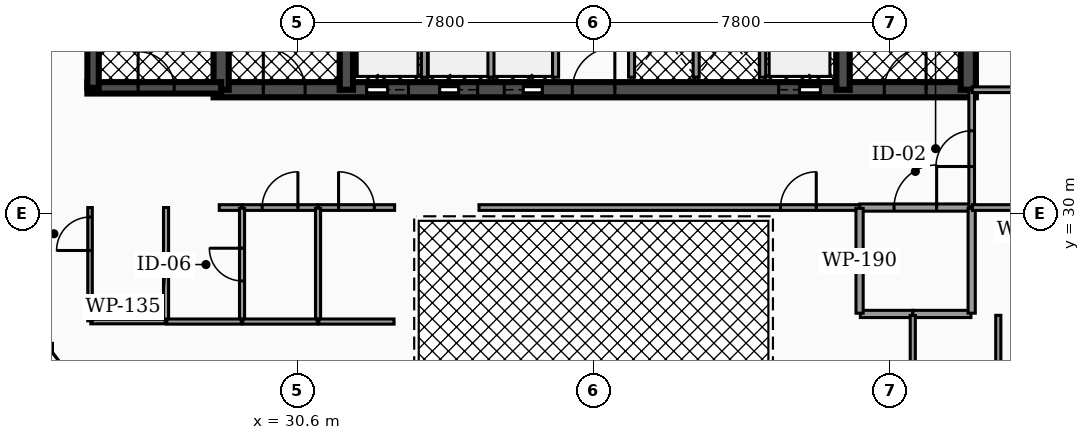
"""IFC4 building model, lengths in metres.
Left out: names, types, materials, properties, quantities, classifications, styles, units other than length and angle.
Written with IfcOpenShell. Run it as: python <this file> out.ifc"""

import sys

from ifc_helpers import new_model, si_unit, direction, frame, frame_2d, origin, place, context, subcontext, project, spatial, rectangle, extrude, element, fill, save


model = new_model("IFC4")
c1 = context("Model", 3, precision=1e-05, world=origin(), true_north=direction((0.0, 1.0)))
c2 = subcontext(c1, "Body", "Model", "MODEL_VIEW")
j1 = project(units=[si_unit("LENGTHUNIT", "METRE"), si_unit("PLANEANGLEUNIT", "RADIAN")], contexts=[c1])
p1 = place(None, origin())
s1 = spatial("IfcSite", under=j1, at=p1, CompositionType="ELEMENT")
p2 = place(p1, origin())
s2 = spatial("IfcBuilding", under=s1, at=p2, CompositionType="ELEMENT")
p3 = place(p2, frame((0.0, 0.0, 164.56)))
s3 = spatial("IfcBuildingStorey", under=s2, at=p3, CompositionType="ELEMENT", Elevation=164.56)
p4 = place(p3, frame((28.4, 33.25, 0.0), z_axis=(0.0, 0.0, 1.0), x_axis=(1.0, 0.0, 0.0)))
e1 = element("IfcWall", 1, at=p4, inside=s3, PredefinedType="SHEAR", context=c2, shape_type="SweptSolid", body=[
    extrude(rectangle(XDim=20.06, YDim=0.4, at=frame_2d((10.03, 0.0))), origin(), (0.0, 0.0, 1.0), 3.5),
])
p5 = place(p4, frame((4.03, 0.0, 0.0)))
e2 = element("IfcOpeningElement", 2, at=p5, cuts=e1, PredefinedType="OPENING", context=c2, shape_type="SweptSolid", body=[
    extrude(rectangle(XDim=1.1, YDim=2.15, at=frame_2d((0.55, 1.075))), frame((0.0, 0.21, 0.0), z_axis=(0.0, -1.0, 0.0), x_axis=(1.0, 0.0, 0.0)), (0.0, 0.0, 1.0), 0.42),
])
p6 = place(p4, frame((14.87, 0.0, 0.0)))
e3 = element("IfcOpeningElement", 3, at=p6, cuts=e1, PredefinedType="OPENING", context=c2, shape_type="SweptSolid", body=[
    extrude(rectangle(XDim=1.1, YDim=2.15, at=frame_2d((0.55, 1.075))), frame((0.0, 0.21, 0.0), z_axis=(0.0, -1.0, 0.0), x_axis=(1.0, 0.0, 0.0)), (0.0, 0.0, 1.0), 0.42),
])
p7 = place(p4, frame((5.95, 0.0, 0.0)))
e4 = element("IfcOpeningElement", 4, at=p7, cuts=e1, PredefinedType="OPENING", context=c2, shape_type="SweptSolid", body=[
    extrude(rectangle(XDim=1.0, YDim=2.1, at=frame_2d((0.5, 1.05))), frame((0.0, 0.21, 0.0), z_axis=(0.0, -1.0, 0.0), x_axis=(1.0, 0.0, 0.0)), (0.0, 0.0, 1.0), 0.42),
])
p8 = place(p4, frame((7.65, 0.0, 0.0)))
e5 = element("IfcOpeningElement", 5, at=p8, cuts=e1, PredefinedType="OPENING", context=c2, shape_type="SweptSolid", body=[
    extrude(rectangle(XDim=1.0, YDim=2.1, at=frame_2d((0.5, 1.05))), frame((0.0, 0.21, 0.0), z_axis=(0.0, -1.0, 0.0), x_axis=(1.0, 0.0, 0.0)), (0.0, 0.0, 1.0), 0.42),
])
p9 = place(p4, frame((1.31, 0.0, 0.0)))
e6 = element("IfcOpeningElement", 6, at=p9, cuts=e1, PredefinedType="OPENING", context=c2, shape_type="SweptSolid", body=[
    extrude(rectangle(XDim=1.1, YDim=2.2, at=frame_2d((0.55, 1.1))), frame((0.0, 0.21, 0.0), z_axis=(0.0, -1.0, 0.0), x_axis=(1.0, 0.0, 0.0)), (0.0, 0.0, 1.0), 0.42),
])
p10 = place(p4, frame((9.44, 0.0, 0.0)))
e7 = element("IfcOpeningElement", 7, at=p10, cuts=e1, PredefinedType="OPENING", context=c2, shape_type="SweptSolid", body=[
    extrude(rectangle(XDim=1.12, YDim=2.05, at=frame_2d((0.56, 1.025))), frame((0.0, 0.21, 0.0), z_axis=(0.0, -1.0, 0.0), x_axis=(1.0, 0.0, 0.0)), (0.0, 0.0, 1.0), 0.42),
])
p11 = place(p4, frame((17.65, 0.0, 0.0)))
e8 = element("IfcOpeningElement", 8, at=p11, cuts=e1, PredefinedType="OPENING", context=c2, shape_type="SweptSolid", body=[
    extrude(rectangle(XDim=1.1, YDim=2.2, at=frame_2d((0.55, 1.1))), frame((0.0, 0.21, 0.0), z_axis=(0.0, -1.0, 0.0), x_axis=(1.0, 0.0, 0.0)), (0.0, 0.0, 1.0), 0.42),
])
p12 = place(p3, frame((28.6, 33.25, 0.0), z_axis=(0.0, 0.0, 1.0), x_axis=(0.0, 1.0, 0.0)))
e9 = element("IfcWall", 9, at=p12, inside=s3, PredefinedType="SHEAR", context=c2, shape_type="SweptSolid", body=[
    extrude(rectangle(XDim=10.2, YDim=0.4, at=frame_2d((5.1, 0.0))), origin(), (0.0, 0.0, 1.0), 3.5),
])
for number, where, z_axis, x_axis in (
    (10, (31.895, 33.25, 0.0), (0.0, 0.0, 1.0), (0.0, 1.0, 0.0)),
    (11, (44.965, 33.25, 0.0), (0.0, 0.0, 1.0), (0.0, 1.0, 0.0)),
):
    element("IfcWall", number, at=place(p3, frame(where, z_axis=z_axis, x_axis=x_axis)), inside=s3, PredefinedType="SHEAR", context=c2, shape_type="SweptSolid", body=[
        extrude(rectangle(XDim=10.2, YDim=0.35, at=frame_2d((5.1, 0.0))), origin(), (0.0, 0.0, 1.0), 3.5),
    ])
p13 = place(p3, frame((48.26, 33.25, 0.0), z_axis=(0.0, 0.0, 1.0), x_axis=(0.0, 1.0, 0.0)))
e12 = element("IfcWall", 12, at=p13, inside=s3, PredefinedType="SHEAR", context=c2, shape_type="SweptSolid", body=[
    extrude(rectangle(XDim=10.2, YDim=0.4, at=frame_2d((5.1, 0.0))), origin(), (0.0, 0.0, 1.0), 3.5),
])
p14 = place(p3, frame((25.08, 33.3, 0.0), z_axis=(0.0, 0.0, 1.0), x_axis=(1.0, 0.0, 0.0)))
e13 = element("IfcWall", 13, at=p14, inside=s3, PredefinedType="SHEAR", context=c2, shape_type="SweptSolid", body=[
    extrude(rectangle(XDim=3.52, YDim=0.3, at=frame_2d((1.76, 0.0))), origin(), (0.0, 0.0, 1.0), 3.5),
])
p15 = place(p14, frame((1.335, 0.0, 0.0)))
e14 = element("IfcOpeningElement", 14, at=p15, cuts=e13, PredefinedType="OPENING", context=c2, shape_type="SweptSolid", body=[
    extrude(rectangle(XDim=0.95, YDim=2.2, at=frame_2d((0.475, 1.1))), frame((0.0, 0.16, 0.0), z_axis=(0.0, -1.0, 0.0), x_axis=(1.0, 0.0, 0.0)), (0.0, 0.0, 1.0), 0.32),
])
p16 = place(p3, frame((25.23, 33.3, 0.0), z_axis=(0.0, 0.0, 1.0), x_axis=(0.0, 1.0, 0.0)))
e15 = element("IfcWall", 15, at=p16, inside=s3, PredefinedType="SHEAR", context=c2, shape_type="SweptSolid", body=[
    extrude(rectangle(XDim=7.6, YDim=0.3, at=frame_2d((3.8, 0.0))), origin(), (0.0, 0.0, 1.0), 3.5),
])
for number, where, z_axis, x_axis in (
    (16, (33.95, 33.58, 0.0), (0.0, 0.0, 1.0), (0.0, 1.0, 0.0)),
    (17, (42.85, 33.58, 0.0), (0.0, 0.0, 1.0), (0.0, 1.0, 0.0)),
):
    element("IfcWall", number, at=place(p3, frame(where, z_axis=z_axis, x_axis=x_axis)), inside=s3, PredefinedType="SOLIDWALL", context=c2, shape_type="SweptSolid", body=[
        extrude(rectangle(XDim=2.45, YDim=0.16, at=frame_2d((1.225, 0.0))), origin(), (0.0, 0.0, 1.0), 2.472),
    ])
for number, where, z_axis, x_axis in (
    (18, (35.7, 33.58, 0.0), (0.0, 0.0, 1.0), (0.0, 1.0, 0.0)),
    (19, (37.4, 33.58, 0.0), (0.0, 0.0, 1.0), (0.0, 1.0, 0.0)),
    (20, (39.4, 33.58, 0.0), (0.0, 0.0, 1.0), (0.0, 1.0, 0.0)),
    (21, (41.1, 33.58, 0.0), (0.0, 0.0, 1.0), (0.0, 1.0, 0.0)),
):
    element("IfcWall", number, at=place(p3, frame(where, z_axis=z_axis, x_axis=x_axis)), inside=s3, PredefinedType="SOLIDWALL", context=c2, shape_type="SweptSolid", body=[
        extrude(rectangle(XDim=2.25, YDim=0.16, at=frame_2d((1.125, 0.0))), origin(), (0.0, 0.0, 1.0), 2.472),
    ])
p17 = place(p3, frame((45.405, 30.15, 0.0), z_axis=(0.0, 0.0, 1.0), x_axis=(1.0, 0.0, 0.0)))
e22 = element("IfcWall", 22, at=p17, inside=s3, PredefinedType="PARTITIONING", context=c2, shape_type="SweptSolid", body=[
    extrude(rectangle(XDim=2.925, YDim=0.19, at=frame_2d((1.462, 0.0))), origin(), (0.0, 0.0, 1.0), 2.457),
])
p18 = place(p17, frame((0.903, 0.0, 0.0)))
e23 = element("IfcOpeningElement", 23, at=p18, cuts=e22, PredefinedType="OPENING", context=c2, shape_type="SweptSolid", body=[
    extrude(rectangle(XDim=1.12, YDim=2.05, at=frame_2d((0.56, 1.025))), frame((0.0, 0.105, 0.0), z_axis=(0.0, -1.0, 0.0), x_axis=(1.0, 0.0, 0.0)), (0.0, 0.0, 1.0), 0.21),
])
p19 = place(p3, frame((48.35, 30.17, 0.0), z_axis=(0.0, 0.0, 1.0), x_axis=(0.0, 1.0, 0.0)))
e24 = element("IfcWall", 24, at=p19, inside=s3, PredefinedType="PARTITIONING", context=c2, shape_type="SweptSolid", body=[
    extrude(rectangle(XDim=3.06, YDim=0.15, at=frame_2d((1.53, 0.0))), origin(), (0.0, 0.0, 1.0), 2.457),
])
p20 = place(p19, frame((1.06, 0.0, 0.0)))
e25 = element("IfcOpeningElement", 25, at=p20, cuts=e24, PredefinedType="OPENING", context=c2, shape_type="SweptSolid", body=[
    extrude(rectangle(XDim=0.94, YDim=2.05, at=frame_2d((0.47, 1.025))), frame((0.0, 0.085, 0.0), z_axis=(0.0, -1.0, 0.0), x_axis=(1.0, 0.0, 0.0)), (0.0, 0.0, 1.0), 0.17),
])
p21 = place(p3, frame((28.55, 30.15, 0.0), z_axis=(0.0, 0.0, 1.0), x_axis=(1.0, 0.0, 0.0)))
e26 = element("IfcWall", 26, at=p21, inside=s3, PredefinedType="PARTITIONING", context=c2, shape_type="SweptSolid", body=[
    extrude(rectangle(XDim=0.595, YDim=0.15, at=frame_2d((0.297, 0.0))), origin(), (0.0, 0.0, 1.0), 2.457),
])
p22 = place(p3, frame((29.155, 30.15, 0.0), z_axis=(0.0, 0.0, 1.0), x_axis=(1.0, 0.0, 0.0)))
e27 = element("IfcWall", 27, at=p22, inside=s3, PredefinedType="PARTITIONING", context=c2, shape_type="SweptSolid", body=[
    extrude(rectangle(XDim=1.99, YDim=0.15, at=frame_2d((0.995, 0.0))), origin(), (0.0, 0.0, 1.0), 2.457),
])
p23 = place(p22, frame((0.525, 0.0, 0.0)))
e28 = element("IfcOpeningElement", 28, at=p23, cuts=e27, PredefinedType="OPENING", context=c2, shape_type="SweptSolid", body=[
    extrude(rectangle(XDim=0.94, YDim=2.05, at=frame_2d((0.47, 1.025))), frame((0.0, 0.085, 0.0), z_axis=(0.0, -1.0, 0.0), x_axis=(1.0, 0.0, 0.0)), (0.0, 0.0, 1.0), 0.17),
])
p24 = place(p3, frame((31.155, 30.15, 0.0), z_axis=(0.0, 0.0, 1.0), x_axis=(1.0, 0.0, 0.0)))
e29 = element("IfcWall", 29, at=p24, inside=s3, PredefinedType="PARTITIONING", context=c2, shape_type="SweptSolid", body=[
    extrude(rectangle(XDim=2.01, YDim=0.15, at=frame_2d((1.005, 0.0))), origin(), (0.0, 0.0, 1.0), 2.457),
])
p25 = place(p24, frame((0.535, 0.0, 0.0)))
e30 = element("IfcOpeningElement", 30, at=p25, cuts=e29, PredefinedType="OPENING", context=c2, shape_type="SweptSolid", body=[
    extrude(rectangle(XDim=0.94, YDim=2.05, at=frame_2d((0.47, 1.025))), frame((0.0, 0.085, 0.0), z_axis=(0.0, -1.0, 0.0), x_axis=(1.0, 0.0, 0.0)), (0.0, 0.0, 1.0), 0.17),
])
p26 = place(p3, frame((35.385, 30.15, 0.0), z_axis=(0.0, 0.0, 1.0), x_axis=(1.0, 0.0, 0.0)))
e31 = element("IfcWall", 31, at=p26, inside=s3, PredefinedType="PARTITIONING", context=c2, shape_type="SweptSolid", body=[
    extrude(rectangle(XDim=10.01, YDim=0.15, at=frame_2d((5.005, 0.0))), origin(), (0.0, 0.0, 1.0), 2.457),
])
p27 = place(p26, frame((7.935, 0.0, 0.0)))
e32 = element("IfcOpeningElement", 32, at=p27, cuts=e31, PredefinedType="OPENING", context=c2, shape_type="SweptSolid", body=[
    extrude(rectangle(XDim=0.94, YDim=2.05, at=frame_2d((0.47, 1.025))), frame((0.0, 0.085, 0.0), z_axis=(0.0, -1.0, 0.0), x_axis=(1.0, 0.0, 0.0)), (0.0, 0.0, 1.0), 0.17),
])
p28 = place(p3, frame((45.42, 27.35, 0.0), z_axis=(0.0, 0.0, 1.0), x_axis=(1.0, 0.0, 0.0)))
e33 = element("IfcWall", 33, at=p28, inside=s3, PredefinedType="PARTITIONING", context=c2, shape_type="SweptSolid", body=[
    extrude(rectangle(XDim=1.375, YDim=0.19, at=frame_2d((0.688, 0.0))), origin(), (0.0, 0.0, 1.0), 2.457),
])
p29 = place(p3, frame((45.4, 27.37, 0.0), z_axis=(0.0, 0.0, 1.0), x_axis=(0.0, 1.0, 0.0)))
e34 = element("IfcWall", 34, at=p29, inside=s3, PredefinedType="PARTITIONING", context=c2, shape_type="SweptSolid", body=[
    extrude(rectangle(XDim=2.76, YDim=0.19, at=frame_2d((1.38, 0.0))), origin(), (0.0, 0.0, 1.0), 2.457),
])
p30 = place(p3, frame((46.805, 27.35, 0.0), z_axis=(0.0, 0.0, 1.0), x_axis=(1.0, 0.0, 0.0)))
e35 = element("IfcWall", 35, at=p30, inside=s3, PredefinedType="PARTITIONING", context=c2, shape_type="SweptSolid", body=[
    extrude(rectangle(XDim=1.525, YDim=0.19, at=frame_2d((0.763, 0.0))), origin(), (0.0, 0.0, 1.0), 2.457),
])
p31 = place(p3, frame((48.35, 27.37, 0.0), z_axis=(0.0, 0.0, 1.0), x_axis=(0.0, 1.0, 0.0)))
e36 = element("IfcWall", 36, at=p31, inside=s3, PredefinedType="PARTITIONING", context=c2, shape_type="SweptSolid", body=[
    extrude(rectangle(XDim=2.76, YDim=0.19, at=frame_2d((1.38, 0.0))), origin(), (0.0, 0.0, 1.0), 2.457),
])
p32 = place(p3, frame((48.37, 30.15, 0.0), z_axis=(0.0, 0.0, 1.0), x_axis=(1.0, 0.0, 0.0)))
e37 = element("IfcWall", 37, at=p32, inside=s3, PredefinedType="PARTITIONING", context=c2, shape_type="SweptSolid", body=[
    extrude(rectangle(XDim=3.26, YDim=0.15, at=frame_2d((1.63, 0.0))), origin(), (0.0, 0.0, 1.0), 2.457),
])
p33 = place(p3, frame((48.365, 33.25, 0.0), z_axis=(0.0, 0.0, 1.0), x_axis=(1.0, 0.0, 0.0)))
e38 = element("IfcWall", 38, at=p33, inside=s3, PredefinedType="PARTITIONING", context=c2, shape_type="SweptSolid", body=[
    extrude(rectangle(XDim=3.265, YDim=0.15, at=frame_2d((1.632, 0.0))), origin(), (0.0, 0.0, 1.0), 2.457),
])
p34 = place(p3, frame((27.15, 27.17, 0.0), z_axis=(0.0, 0.0, 1.0), x_axis=(0.0, 1.0, 0.0)))
e39 = element("IfcWall", 39, at=p34, inside=s3, PredefinedType="PARTITIONING", context=c2, shape_type="SweptSolid", body=[
    extrude(rectangle(XDim=2.98, YDim=0.135, at=frame_2d((1.49, 0.0))), origin(), (0.0, 0.0, 1.0), 2.457),
])
p35 = place(p3, frame((25.17, 27.15, 0.0), z_axis=(0.0, 0.0, 1.0), x_axis=(1.0, 0.0, 0.0)))
e40 = element("IfcWall", 40, at=p35, inside=s3, PredefinedType="PARTITIONING", context=c2, shape_type="SweptSolid", body=[
    extrude(rectangle(XDim=1.96, YDim=0.12, at=frame_2d((0.98, 0.0))), origin(), (0.0, 0.0, 1.0), 2.457),
])
p36 = place(p3, frame((25.15, 27.17, 0.0), z_axis=(0.0, 0.0, 1.0), x_axis=(0.0, 1.0, 0.0)))
e41 = element("IfcWall", 41, at=p36, inside=s3, PredefinedType="PARTITIONING", context=c2, shape_type="SweptSolid", body=[
    extrude(rectangle(XDim=2.98, YDim=0.12, at=frame_2d((1.49, 0.0))), origin(), (0.0, 0.0, 1.0), 2.457),
])
p37 = place(p36, frame((1.85, 0.0, 0.0)))
e42 = element("IfcOpeningElement", 42, at=p37, cuts=e41, PredefinedType="OPENING", context=c2, shape_type="SweptSolid", body=[
    extrude(rectangle(XDim=0.88, YDim=2.05, at=frame_2d((0.44, 1.025))), frame((0.0, 0.07, 0.0), z_axis=(0.0, -1.0, 0.0), x_axis=(1.0, 0.0, 0.0)), (0.0, 0.0, 1.0), 0.14),
])
p38 = place(p3, frame((29.15, 27.17, 0.0), z_axis=(0.0, 0.0, 1.0), x_axis=(0.0, 1.0, 0.0)))
e43 = element("IfcWall", 43, at=p38, inside=s3, PredefinedType="PARTITIONING", context=c2, shape_type="SweptSolid", body=[
    extrude(rectangle(XDim=2.96, YDim=0.135, at=frame_2d((1.48, 0.0))), origin(), (0.0, 0.0, 1.0), 2.457),
])
p39 = place(p38, frame((1.05, 0.0, 0.0)))
e44 = element("IfcOpeningElement", 44, at=p39, cuts=e43, PredefinedType="OPENING", context=c2, shape_type="SweptSolid", body=[
    extrude(rectangle(XDim=0.86, YDim=2.05, at=frame_2d((0.43, 1.025))), frame((0.0, 0.077, 0.0), z_axis=(0.0, -1.0, 0.0), x_axis=(1.0, 0.0, 0.0)), (0.0, 0.0, 1.0), 0.155),
])
p40 = place(p3, frame((27.17, 27.15, 0.0), z_axis=(0.0, 0.0, 1.0), x_axis=(1.0, 0.0, 0.0)))
e45 = element("IfcWall", 45, at=p40, inside=s3, PredefinedType="PARTITIONING", context=c2, shape_type="SweptSolid", body=[
    extrude(rectangle(XDim=1.96, YDim=0.135, at=frame_2d((0.98, 0.0))), origin(), (0.0, 0.0, 1.0), 2.457),
])
p41 = place(p3, frame((31.15, 27.17, 0.0), z_axis=(0.0, 0.0, 1.0), x_axis=(0.0, 1.0, 0.0)))
e46 = element("IfcWall", 46, at=p41, inside=s3, PredefinedType="PARTITIONING", context=c2, shape_type="SweptSolid", body=[
    extrude(rectangle(XDim=2.96, YDim=0.135, at=frame_2d((1.48, 0.0))), origin(), (0.0, 0.0, 1.0), 2.457),
])
p42 = place(p3, frame((29.17, 27.15, 0.0), z_axis=(0.0, 0.0, 1.0), x_axis=(1.0, 0.0, 0.0)))
e47 = element("IfcWall", 47, at=p42, inside=s3, PredefinedType="PARTITIONING", context=c2, shape_type="SweptSolid", body=[
    extrude(rectangle(XDim=1.96, YDim=0.135, at=frame_2d((0.98, 0.0))), origin(), (0.0, 0.0, 1.0), 2.457),
])
p43 = place(p3, frame((31.17, 27.15, 0.0), z_axis=(0.0, 0.0, 1.0), x_axis=(1.0, 0.0, 0.0)))
e48 = element("IfcWall", 48, at=p43, inside=s3, PredefinedType="PARTITIONING", context=c2, shape_type="SweptSolid", body=[
    extrude(rectangle(XDim=1.98, YDim=0.135, at=frame_2d((0.99, 0.0))), origin(), (0.0, 0.0, 1.0), 2.457),
])
p44 = place(p3, frame((46.8, 25.169, 0.0), z_axis=(0.0, 0.0, 1.0), x_axis=(0.0, 1.0, 0.0)))
e49 = element("IfcWall", 49, at=p44, inside=s3, PredefinedType="PARTITIONING", context=c2, shape_type="SweptSolid", body=[
    extrude(rectangle(XDim=2.14, YDim=0.135, at=frame_2d((1.07, 0.0))), origin(), (0.0, 0.0, 1.0), 2.457),
])
p45 = place(p3, frame((49.05, 25.184, 0.0), z_axis=(0.0, 0.0, 1.0), x_axis=(0.0, 1.0, 0.0)))
e50 = element("IfcWall", 50, at=p45, inside=s3, PredefinedType="PARTITIONING", context=c2, shape_type="SweptSolid", body=[
    extrude(rectangle(XDim=2.13, YDim=0.135, at=frame_2d((1.065, 0.0))), origin(), (0.0, 0.0, 1.0), 2.457),
])
p46 = place(p5, origin())
e51 = element("IfcDoor", 51, at=p46, inside=s3, OperationType="SLIDING_TO_LEFT", PredefinedType="DOOR", context=c2, shape_type="SweptSolid", body=[
    extrude(rectangle(XDim=1.1, YDim=2.15, at=frame_2d((0.55, 1.075))), frame((0.0, 0.025, 0.0), z_axis=(0.0, -1.0, 0.0), x_axis=(1.0, 0.0, 0.0)), (0.0, 0.0, 1.0), 0.05),
])
fill(e2, e51)
p47 = place(p6, origin())
e52 = element("IfcDoor", 52, at=p47, inside=s3, OperationType="SLIDING_TO_RIGHT", PredefinedType="DOOR", context=c2, shape_type="SweptSolid", body=[
    extrude(rectangle(XDim=1.1, YDim=2.15, at=frame_2d((0.55, 1.075))), frame((0.0, 0.025, 0.0), z_axis=(0.0, -1.0, 0.0), x_axis=(1.0, 0.0, 0.0)), (0.0, 0.0, 1.0), 0.05),
])
fill(e3, e52)
p48 = place(p7, origin())
e53 = element("IfcDoor", 53, at=p48, inside=s3, OperationType="SLIDING_TO_LEFT", PredefinedType="DOOR", context=c2, shape_type="SweptSolid", body=[
    extrude(rectangle(XDim=1.0, YDim=2.1, at=frame_2d((0.5, 1.05))), frame((0.0, 0.025, 0.0), z_axis=(0.0, -1.0, 0.0), x_axis=(1.0, 0.0, 0.0)), (0.0, 0.0, 1.0), 0.05),
])
fill(e4, e53)
p49 = place(p8, origin())
e54 = element("IfcDoor", 54, at=p49, inside=s3, OperationType="SLIDING_TO_RIGHT", PredefinedType="DOOR", context=c2, shape_type="SweptSolid", body=[
    extrude(rectangle(XDim=1.0, YDim=2.1, at=frame_2d((0.5, 1.05))), frame((0.0, 0.025, 0.0), z_axis=(0.0, -1.0, 0.0), x_axis=(1.0, 0.0, 0.0)), (0.0, 0.0, 1.0), 0.05),
])
fill(e5, e54)
p50 = place(p9, origin())
e55 = element("IfcDoor", 55, at=p50, inside=s3, OperationType="SINGLE_SWING_LEFT", PredefinedType="DOOR", context=c2, shape_type="SweptSolid", body=[
    extrude(rectangle(XDim=1.1, YDim=2.2, at=frame_2d((0.55, 1.1))), frame((0.0, 0.025, 0.0), z_axis=(0.0, -1.0, 0.0), x_axis=(1.0, 0.0, 0.0)), (0.0, 0.0, 1.0), 0.05),
])
fill(e6, e55)
p51 = place(p10, origin())
e56 = element("IfcDoor", 56, at=p51, inside=s3, OperationType="SINGLE_SWING_RIGHT", PredefinedType="DOOR", context=c2, shape_type="SweptSolid", body=[
    extrude(rectangle(XDim=1.12, YDim=2.05, at=frame_2d((0.56, 1.025))), frame((0.0, 0.025, 0.0), z_axis=(0.0, -1.0, 0.0), x_axis=(1.0, 0.0, 0.0)), (0.0, 0.0, 1.0), 0.05),
])
fill(e7, e56)
p52 = place(p11, origin())
e57 = element("IfcDoor", 57, at=p52, inside=s3, OperationType="SINGLE_SWING_RIGHT", PredefinedType="DOOR", context=c2, shape_type="SweptSolid", body=[
    extrude(rectangle(XDim=1.1, YDim=2.2, at=frame_2d((0.55, 1.1))), frame((0.0, 0.025, 0.0), z_axis=(0.0, -1.0, 0.0), x_axis=(1.0, 0.0, 0.0)), (0.0, 0.0, 1.0), 0.05),
])
fill(e8, e57)
p53 = place(p15, origin())
e58 = element("IfcDoor", 58, at=p53, inside=s3, OperationType="SINGLE_SWING_LEFT", PredefinedType="DOOR", context=c2, shape_type="SweptSolid", body=[
    extrude(rectangle(XDim=0.95, YDim=2.2, at=frame_2d((0.475, 1.1))), frame((0.0, 0.025, 0.0), z_axis=(0.0, -1.0, 0.0), x_axis=(1.0, 0.0, 0.0)), (0.0, 0.0, 1.0), 0.05),
])
fill(e14, e58)
p54 = place(p18, origin())
e59 = element("IfcDoor", 59, at=p54, inside=s3, OperationType="SINGLE_SWING_RIGHT", PredefinedType="DOOR", context=c2, shape_type="SweptSolid", body=[
    extrude(rectangle(XDim=1.12, YDim=2.05, at=frame_2d((0.56, 1.025))), frame((0.0, 0.025, 0.0), z_axis=(0.0, -1.0, 0.0), x_axis=(1.0, 0.0, 0.0)), (0.0, 0.0, 1.0), 0.05),
])
fill(e23, e59)
p55 = place(p20, origin())
e60 = element("IfcDoor", 60, at=p55, inside=s3, OperationType="SINGLE_SWING_LEFT", PredefinedType="DOOR", context=c2, shape_type="SweptSolid", body=[
    extrude(rectangle(XDim=0.94, YDim=2.05, at=frame_2d((0.47, 1.025))), frame((0.0, 0.025, 0.0), z_axis=(0.0, -1.0, 0.0), x_axis=(1.0, 0.0, 0.0)), (0.0, 0.0, 1.0), 0.05),
])
fill(e25, e60)
p56 = place(p23, origin())
e61 = element("IfcDoor", 61, at=p56, inside=s3, OperationType="SINGLE_SWING_RIGHT", PredefinedType="DOOR", context=c2, shape_type="SweptSolid", body=[
    extrude(rectangle(XDim=0.94, YDim=2.05, at=frame_2d((0.47, 1.025))), frame((0.0, 0.025, 0.0), z_axis=(0.0, -1.0, 0.0), x_axis=(1.0, 0.0, 0.0)), (0.0, 0.0, 1.0), 0.05),
])
fill(e28, e61)
p57 = place(p25, origin())
e62 = element("IfcDoor", 62, at=p57, inside=s3, OperationType="SINGLE_SWING_LEFT", PredefinedType="DOOR", context=c2, shape_type="SweptSolid", body=[
    extrude(rectangle(XDim=0.94, YDim=2.05, at=frame_2d((0.47, 1.025))), frame((0.0, 0.025, 0.0), z_axis=(0.0, -1.0, 0.0), x_axis=(1.0, 0.0, 0.0)), (0.0, 0.0, 1.0), 0.05),
])
fill(e30, e62)
p58 = place(p27, origin())
e63 = element("IfcDoor", 63, at=p58, inside=s3, OperationType="SINGLE_SWING_RIGHT", PredefinedType="DOOR", context=c2, shape_type="SweptSolid", body=[
    extrude(rectangle(XDim=0.94, YDim=2.05, at=frame_2d((0.47, 1.025))), frame((0.0, 0.025, 0.0), z_axis=(0.0, -1.0, 0.0), x_axis=(1.0, 0.0, 0.0)), (0.0, 0.0, 1.0), 0.05),
])
fill(e32, e63)
p59 = place(p37, origin())
e64 = element("IfcDoor", 64, at=p59, inside=s3, OperationType="SINGLE_SWING_LEFT", PredefinedType="DOOR", context=c2, shape_type="SweptSolid", body=[
    extrude(rectangle(XDim=0.88, YDim=2.05, at=frame_2d((0.44, 1.025))), frame((0.0, 0.025, 0.0), z_axis=(0.0, -1.0, 0.0), x_axis=(1.0, 0.0, 0.0)), (0.0, 0.0, 1.0), 0.05),
])
fill(e42, e64)
p60 = place(p39, origin())
e65 = element("IfcDoor", 65, at=p60, inside=s3, OperationType="SINGLE_SWING_RIGHT", PredefinedType="DOOR", context=c2, shape_type="SweptSolid", body=[
    extrude(rectangle(XDim=0.86, YDim=2.05, at=frame_2d((0.43, 1.025))), frame((0.0, 0.025, 0.0), z_axis=(0.0, -1.0, 0.0), x_axis=(1.0, 0.0, 0.0)), (0.0, 0.0, 1.0), 0.05),
])
fill(e44, e65)
save(model, sys.argv[1])
